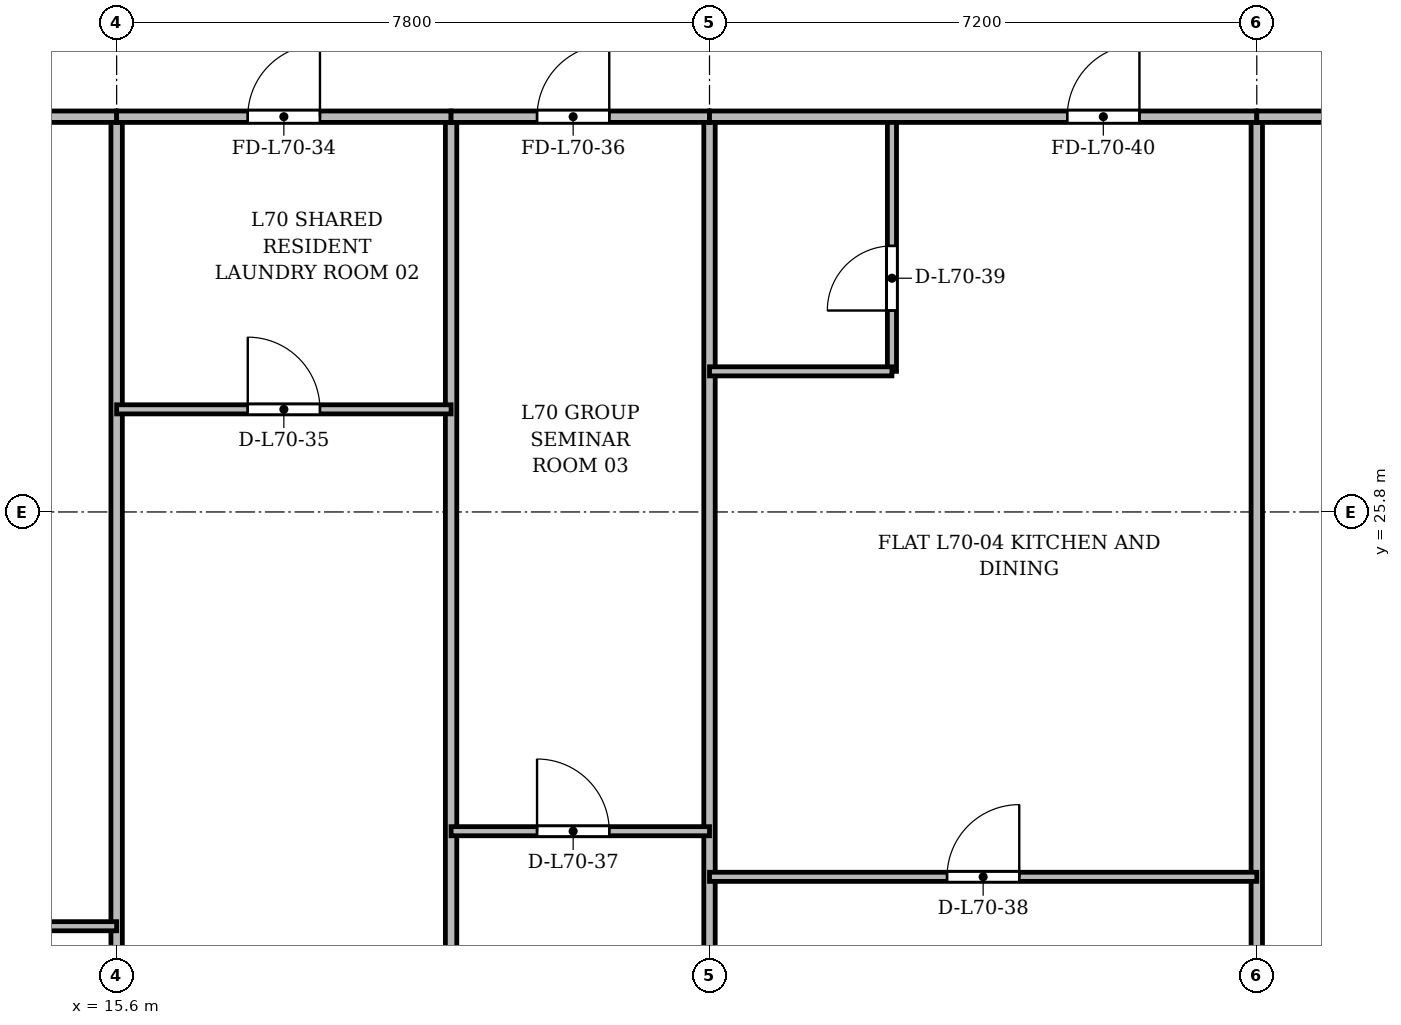
"""IFC4 building model, lengths in metres.
Left out: names, types, materials, properties, quantities, classifications, styles, units other than length and angle.
Written with IfcOpenShell. Run it as: python <this file> out.ifc"""

import sys

from ifc_helpers import new_model, si_unit, direction, frame, frame_2d, origin, place, context, subcontext, project, spatial, rectangle, extrude, source, transform, mapped, element, fill, save


model = new_model("IFC4")
c1 = context("Model", 3, precision=1e-05, world=origin(), true_north=direction((0.0, 1.0)))
c2 = subcontext(c1, "Body", "Model", "MODEL_VIEW")
j1 = project(units=[si_unit("LENGTHUNIT", "METRE"), si_unit("PLANEANGLEUNIT", "RADIAN")], contexts=[c1])
p1 = place(None, origin())
s1 = spatial("IfcSite", under=j1, at=p1, CompositionType="ELEMENT")
p2 = place(p1, origin())
s2 = spatial("IfcBuilding", under=s1, at=p2, CompositionType="ELEMENT")
p3 = place(p2, frame((0.0, 0.0, 270.3)))
s3 = spatial("IfcBuildingStorey", under=s2, at=p3, CompositionType="ELEMENT", Elevation=270.3)
p4 = place(p3, frame((15.6, 3.725, 0.0), z_axis=(0.0, 0.0, 1.0), x_axis=(0.0, 1.0, 0.0)))
e1 = element("IfcWall", 1, at=p4, inside=s3, PredefinedType="PARTITIONING", context=c2, shape_type="SweptSolid", body=[
    extrude(rectangle(XDim=27.275, YDim=0.15, at=frame_2d((13.637, 0.0))), origin(), (0.0, 0.0, 1.0), 2.87),
])
p5 = place(p3, frame((20.0, 3.725, 0.0), z_axis=(0.0, 0.0, 1.0), x_axis=(0.0, 1.0, 0.0)))
e2 = element("IfcWall", 2, at=p5, inside=s3, PredefinedType="PARTITIONING", context=c2, shape_type="SweptSolid", body=[
    extrude(rectangle(XDim=27.275, YDim=0.15, at=frame_2d((13.637, 0.0))), origin(), (0.0, 0.0, 1.0), 2.92),
])
for number, where, z_axis, x_axis in (
    (3, (23.4, 3.725, 0.0), (0.0, 0.0, 1.0), (0.0, 1.0, 0.0)),
    (4, (30.6, 3.725, 0.0), (0.0, 0.0, 1.0), (0.0, 1.0, 0.0)),
):
    element("IfcWall", number, at=place(p3, frame(where, z_axis=z_axis, x_axis=x_axis)), inside=s3, PredefinedType="PARTITIONING", context=c2, shape_type="SweptSolid", body=[
        extrude(rectangle(XDim=27.275, YDim=0.15, at=frame_2d((13.637, 0.0))), origin(), (0.0, 0.0, 1.0), 2.87),
    ])
p6 = place(p3, frame((8.44, 20.35, 0.0), z_axis=(0.0, 0.0, 1.0), x_axis=(1.0, 0.0, 0.0)))
e5 = element("IfcWall", 5, at=p6, inside=s3, PredefinedType="PARTITIONING", context=c2, shape_type="SweptSolid", body=[
    extrude(rectangle(XDim=7.16, YDim=0.12, at=frame_2d((3.58, 0.0))), origin(), (0.0, 0.0, 1.0), 2.87),
])
p7 = place(p6, frame((3.105, 0.0, 0.0)))
e6 = element("IfcOpeningElement", 6, at=p7, cuts=e5, PredefinedType="OPENING", context=c2, shape_type="SweptSolid", body=[
    extrude(rectangle(XDim=0.95, YDim=2.15, at=frame_2d((0.475, 1.075))), frame((0.0, 0.07, 0.0), z_axis=(0.0, -1.0, 0.0), x_axis=(1.0, 0.0, 0.0)), (0.0, 0.0, 1.0), 0.14),
])
p8 = place(p3, frame((8.425, 31.0, 0.0), z_axis=(0.0, 0.0, 1.0), x_axis=(1.0, 0.0, 0.0)))
e7 = element("IfcWall", 7, at=p8, inside=s3, PredefinedType="PARTITIONING", context=c2, shape_type="SweptSolid", body=[
    extrude(rectangle(XDim=7.175, YDim=0.15, at=frame_2d((3.587, 0.0))), origin(), (0.0, 0.0, 1.0), 2.87),
])
p9 = place(p8, frame((4.681, 0.0, 0.0)))
e8 = element("IfcOpeningElement", 8, at=p9, cuts=e7, PredefinedType="OPENING", context=c2, shape_type="SweptSolid", body=[
    extrude(rectangle(XDim=0.95, YDim=2.15, at=frame_2d((0.475, 1.075))), frame((0.0, 0.085, 0.0), z_axis=(0.0, -1.0, 0.0), x_axis=(1.0, 0.0, 0.0)), (0.0, 0.0, 1.0), 0.17),
])
p10 = place(p3, frame((15.6, 31.0, 0.0), z_axis=(0.0, 0.0, 1.0), x_axis=(1.0, 0.0, 0.0)))
e9 = element("IfcWall", 9, at=p10, inside=s3, PredefinedType="PARTITIONING", context=c2, shape_type="SweptSolid", body=[
    extrude(rectangle(XDim=4.4, YDim=0.15, at=frame_2d((2.2, 0.0))), origin(), (0.0, 0.0, 1.0), 2.87),
])
p11 = place(p10, frame((1.725, 0.0, 0.0)))
e10 = element("IfcOpeningElement", 10, at=p11, cuts=e9, PredefinedType="OPENING", context=c2, shape_type="SweptSolid", body=[
    extrude(rectangle(XDim=0.95, YDim=2.15, at=frame_2d((0.475, 1.075))), frame((0.0, 0.085, 0.0), z_axis=(0.0, -1.0, 0.0), x_axis=(1.0, 0.0, 0.0)), (0.0, 0.0, 1.0), 0.17),
])
p12 = place(p3, frame((15.6, 27.15, 0.0), z_axis=(0.0, 0.0, 1.0), x_axis=(1.0, 0.0, 0.0)))
e11 = element("IfcWall", 11, at=p12, inside=s3, PredefinedType="PARTITIONING", context=c2, shape_type="SweptSolid", body=[
    extrude(rectangle(XDim=4.4, YDim=0.12, at=frame_2d((2.2, 0.0))), origin(), (0.0, 0.0, 1.0), 2.87),
])
p13 = place(p12, frame((1.725, 0.0, 0.0)))
e12 = element("IfcOpeningElement", 12, at=p13, cuts=e11, PredefinedType="OPENING", context=c2, shape_type="SweptSolid", body=[
    extrude(rectangle(XDim=0.95, YDim=2.15, at=frame_2d((0.475, 1.075))), frame((0.0, 0.07, 0.0), z_axis=(0.0, -1.0, 0.0), x_axis=(1.0, 0.0, 0.0)), (0.0, 0.0, 1.0), 0.14),
])
p14 = place(p3, frame((20.0, 31.0, 0.0), z_axis=(0.0, 0.0, 1.0), x_axis=(1.0, 0.0, 0.0)))
e13 = element("IfcWall", 13, at=p14, inside=s3, PredefinedType="PARTITIONING", context=c2, shape_type="SweptSolid", body=[
    extrude(rectangle(XDim=3.4, YDim=0.15, at=frame_2d((1.7, 0.0))), origin(), (0.0, 0.0, 1.0), 2.87),
])
p15 = place(p14, frame((1.131, 0.0, 0.0)))
e14 = element("IfcOpeningElement", 14, at=p15, cuts=e13, PredefinedType="OPENING", context=c2, shape_type="SweptSolid", body=[
    extrude(rectangle(XDim=0.95, YDim=2.15, at=frame_2d((0.475, 1.075))), frame((0.0, 0.085, 0.0), z_axis=(0.0, -1.0, 0.0), x_axis=(1.0, 0.0, 0.0)), (0.0, 0.0, 1.0), 0.17),
])
p16 = place(p3, frame((20.0, 21.6, 0.0), z_axis=(0.0, 0.0, 1.0), x_axis=(1.0, 0.0, 0.0)))
e15 = element("IfcWall", 15, at=p16, inside=s3, PredefinedType="PARTITIONING", context=c2, shape_type="SweptSolid", body=[
    extrude(rectangle(XDim=3.4, YDim=0.12, at=frame_2d((1.7, 0.0))), origin(), (0.0, 0.0, 1.0), 2.87),
])
p17 = place(p16, frame((1.131, 0.0, 0.0)))
e16 = element("IfcOpeningElement", 16, at=p17, cuts=e15, PredefinedType="OPENING", context=c2, shape_type="SweptSolid", body=[
    extrude(rectangle(XDim=0.95, YDim=2.15, at=frame_2d((0.475, 1.075))), frame((0.0, 0.07, 0.0), z_axis=(0.0, -1.0, 0.0), x_axis=(1.0, 0.0, 0.0)), (0.0, 0.0, 1.0), 0.14),
])
p18 = place(p3, frame((23.4, 21.0, 0.0), z_axis=(0.0, 0.0, 1.0), x_axis=(1.0, 0.0, 0.0)))
e17 = element("IfcWall", 17, at=p18, inside=s3, PredefinedType="PARTITIONING", context=c2, shape_type="SweptSolid", body=[
    extrude(rectangle(XDim=7.2, YDim=0.12, at=frame_2d((3.6, 0.0))), origin(), (0.0, 0.0, 1.0), 2.87),
])
p19 = place(p18, frame((3.125, 0.0, 0.0)))
e18 = element("IfcOpeningElement", 18, at=p19, cuts=e17, PredefinedType="OPENING", context=c2, shape_type="SweptSolid", body=[
    extrude(rectangle(XDim=0.95, YDim=2.15, at=frame_2d((0.475, 1.075))), frame((0.0, 0.07, 0.0), z_axis=(0.0, -1.0, 0.0), x_axis=(1.0, 0.0, 0.0)), (0.0, 0.0, 1.0), 0.14),
])
p20 = place(p3, frame((25.8, 27.65, 0.0), z_axis=(0.0, 0.0, 1.0), x_axis=(0.0, 1.0, 0.0)))
e19 = element("IfcWall", 19, at=p20, inside=s3, PredefinedType="PARTITIONING", context=c2, shape_type="SweptSolid", body=[
    extrude(rectangle(XDim=3.35, YDim=0.12, at=frame_2d((1.675, 0.0))), origin(), (0.0, 0.0, 1.0), 3.37),
])
p21 = place(p20, frame((0.8, 0.0, 0.0)))
e20 = element("IfcOpeningElement", 20, at=p21, cuts=e19, PredefinedType="OPENING", context=c2, shape_type="SweptSolid", body=[
    extrude(rectangle(XDim=0.85, YDim=2.1, at=frame_2d((0.425, 1.05))), frame((0.0, 0.07, 0.0), z_axis=(0.0, -1.0, 0.0), x_axis=(1.0, 0.0, 0.0)), (0.0, 0.0, 1.0), 0.14),
])
p22 = place(p3, frame((23.4, 27.65, 0.0), z_axis=(0.0, 0.0, 1.0), x_axis=(1.0, 0.0, 0.0)))
e21 = element("IfcWall", 21, at=p22, inside=s3, PredefinedType="PARTITIONING", context=c2, shape_type="SweptSolid", body=[
    extrude(rectangle(XDim=2.4, YDim=0.12, at=frame_2d((1.2, 0.0))), origin(), (0.0, 0.0, 1.0), 2.87),
])
p23 = place(p3, frame((23.4, 31.0, 0.0), z_axis=(0.0, 0.0, 1.0), x_axis=(1.0, 0.0, 0.0)))
e22 = element("IfcWall", 22, at=p23, inside=s3, PredefinedType="PARTITIONING", context=c2, shape_type="SweptSolid", body=[
    extrude(rectangle(XDim=7.2, YDim=0.15, at=frame_2d((3.6, 0.0))), origin(), (0.0, 0.0, 1.0), 2.87),
])
p24 = place(p23, frame((4.706, 0.0, 0.0)))
e23 = element("IfcOpeningElement", 23, at=p24, cuts=e22, PredefinedType="OPENING", context=c2, shape_type="SweptSolid", body=[
    extrude(rectangle(XDim=0.95, YDim=2.15, at=frame_2d((0.475, 1.075))), frame((0.0, 0.085, 0.0), z_axis=(0.0, -1.0, 0.0), x_axis=(1.0, 0.0, 0.0)), (0.0, 0.0, 1.0), 0.17),
])
p25 = place(p3, frame((30.6, 31.0, 0.0), z_axis=(0.0, 0.0, 1.0), x_axis=(1.0, 0.0, 0.0)))
e24 = element("IfcWall", 24, at=p25, inside=s3, PredefinedType="PARTITIONING", context=c2, shape_type="SweptSolid", body=[
    extrude(rectangle(XDim=13.2, YDim=0.15, at=frame_2d((6.6, 0.0))), origin(), (0.0, 0.0, 1.0), 2.87),
])
p26 = place(p25, frame((5.8, 0.0, 0.0)))
e25 = element("IfcOpeningElement", 25, at=p26, cuts=e24, PredefinedType="OPENING", context=c2, shape_type="SweptSolid", body=[
    extrude(rectangle(XDim=1.6, YDim=2.2, at=frame_2d((0.8, 1.1))), frame((0.0, 0.085, 0.0), z_axis=(0.0, -1.0, 0.0), x_axis=(1.0, 0.0, 0.0)), (0.0, 0.0, 1.0), 0.17),
])
m1 = source(origin(), c2, "Body", "SweptSolid", [
    extrude(rectangle(XDim=0.95, YDim=2.15, at=frame_2d((0.475, 1.075))), frame((0.0, 0.025, 0.0), z_axis=(0.0, -1.0, 0.0), x_axis=(1.0, 0.0, 0.0)), (0.0, 0.0, 1.0), 0.05),
])
p27 = place(p11, origin())
e26 = element("IfcDoor", 26, at=p27, inside=s3, OperationType="SINGLE_SWING_RIGHT", PredefinedType="DOOR", context=c2, shape_type="MappedRepresentation", body=[
    mapped(m1, transform((0.0, 0.0, 0.0), x_axis=(1.0, 0.0, 0.0), y_axis=(0.0, 1.0, 0.0), z_axis=(0.0, 0.0, 1.0), scale=1.0)),
])
fill(e10, e26)
p28 = place(p13, origin())
e27 = element("IfcDoor", 27, at=p28, inside=s3, OperationType="SINGLE_SWING_LEFT", PredefinedType="DOOR", context=c2, shape_type="MappedRepresentation", body=[
    mapped(m1, transform((0.0, 0.0, 0.0), x_axis=(1.0, 0.0, 0.0), y_axis=(0.0, 1.0, 0.0), z_axis=(0.0, 0.0, 1.0), scale=1.0)),
])
fill(e12, e27)
p29 = place(p15, origin())
e28 = element("IfcDoor", 28, at=p29, inside=s3, OperationType="SINGLE_SWING_RIGHT", PredefinedType="DOOR", context=c2, shape_type="MappedRepresentation", body=[
    mapped(m1, transform((0.0, 0.0, 0.0), x_axis=(1.0, 0.0, 0.0), y_axis=(0.0, 1.0, 0.0), z_axis=(0.0, 0.0, 1.0), scale=1.0)),
])
fill(e14, e28)
p30 = place(p17, origin())
e29 = element("IfcDoor", 29, at=p30, inside=s3, OperationType="SINGLE_SWING_LEFT", PredefinedType="DOOR", context=c2, shape_type="MappedRepresentation", body=[
    mapped(m1, transform((0.0, 0.0, 0.0), x_axis=(1.0, 0.0, 0.0), y_axis=(0.0, 1.0, 0.0), z_axis=(0.0, 0.0, 1.0), scale=1.0)),
])
fill(e16, e29)
p31 = place(p19, origin())
e30 = element("IfcDoor", 30, at=p31, inside=s3, OperationType="SINGLE_SWING_RIGHT", PredefinedType="DOOR", context=c2, shape_type="MappedRepresentation", body=[
    mapped(m1, transform((0.0, 0.0, 0.0), x_axis=(1.0, 0.0, 0.0), y_axis=(0.0, 1.0, 0.0), z_axis=(0.0, 0.0, 1.0), scale=1.0)),
])
fill(e18, e30)
m2 = source(origin(), c2, "Body", "SweptSolid", [
    extrude(rectangle(XDim=0.85, YDim=2.1, at=frame_2d((0.425, 1.05))), frame((0.0, 0.025, 0.0), z_axis=(0.0, -1.0, 0.0), x_axis=(1.0, 0.0, 0.0)), (0.0, 0.0, 1.0), 0.05),
])
p32 = place(p21, origin())
e31 = element("IfcDoor", 31, at=p32, inside=s3, OperationType="SINGLE_SWING_LEFT", PredefinedType="DOOR", context=c2, shape_type="MappedRepresentation", body=[
    mapped(m2, transform((0.0, 0.0, 0.0), x_axis=(1.0, 0.0, 0.0), y_axis=(0.0, 1.0, 0.0), z_axis=(0.0, 0.0, 1.0), scale=1.0)),
])
fill(e20, e31)
p33 = place(p24, origin())
e32 = element("IfcDoor", 32, at=p33, inside=s3, OperationType="SINGLE_SWING_RIGHT", PredefinedType="DOOR", context=c2, shape_type="MappedRepresentation", body=[
    mapped(m1, transform((0.0, 0.0, 0.0), x_axis=(1.0, 0.0, 0.0), y_axis=(0.0, 1.0, 0.0), z_axis=(0.0, 0.0, 1.0), scale=1.0)),
])
fill(e23, e32)
save(model, sys.argv[1])
